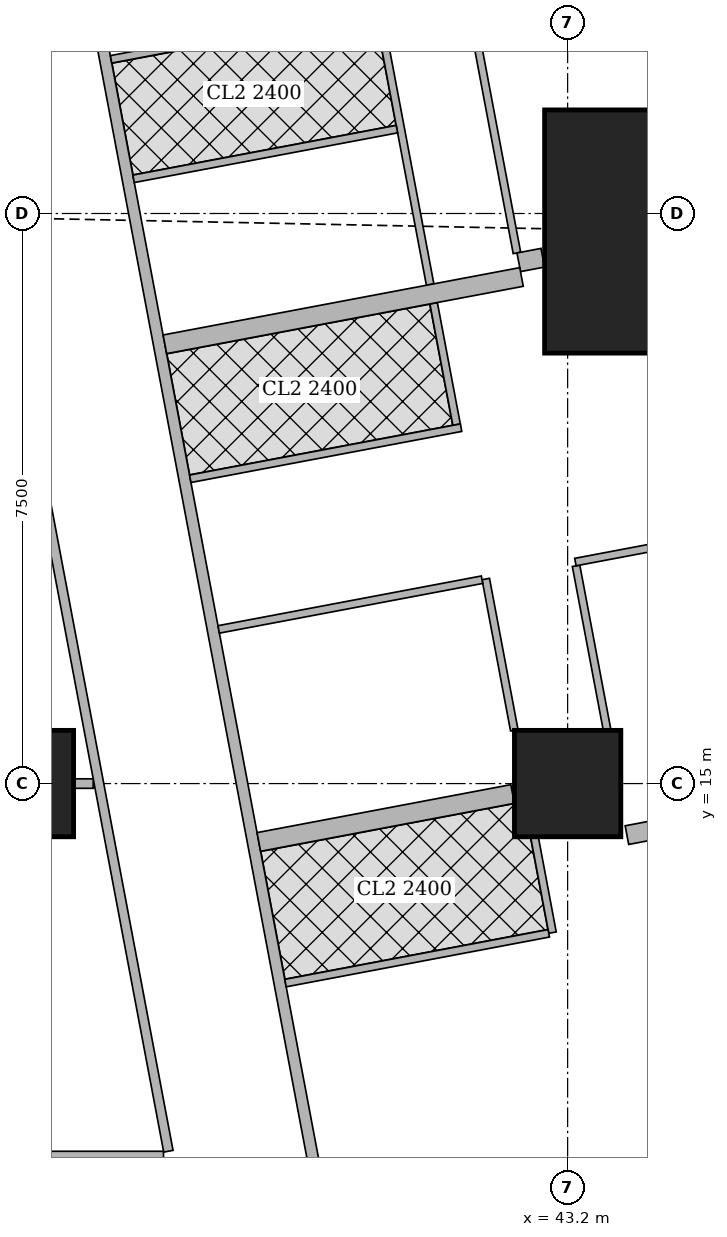
"""IFC4 building model, lengths in metres.
Left out: names, types, materials, properties, quantities, classifications, styles, units other than length and angle.
Written with IfcOpenShell. Run it as: python <this file> out.ifc"""

import sys

from ifc_helpers import new_model, si_unit, direction, frame, frame_2d, origin, origin_2d, place, context, subcontext, project, spatial, rectangle, extrude, element, fill, save


model = new_model("IFC4")
c1 = context("Model", 3, precision=1e-05, world=origin(), true_north=direction((0.0, 1.0)))
c2 = subcontext(c1, "Body", "Model", "MODEL_VIEW")
j1 = project(units=[si_unit("LENGTHUNIT", "METRE"), si_unit("PLANEANGLEUNIT", "RADIAN")], contexts=[c1])
p1 = place(None, origin())
s1 = spatial("IfcSite", under=j1, at=p1, CompositionType="ELEMENT")
p2 = place(p1, origin())
s2 = spatial("IfcBuilding", under=s1, at=p2, CompositionType="ELEMENT")
p3 = place(p2, frame((0.0, 0.0, 251.6)))
s3 = spatial("IfcBuildingStorey", under=s2, at=p3, CompositionType="ELEMENT", Elevation=251.6)
for number, where, z_axis, x_axis in (
    (1, (36.0, 15.0, 0.0), (0.0, 0.0, 1.0), (1.0, 0.0, 0.0)),
    (2, (43.2, 15.0, 0.0), (0.0, 0.0, 1.0), (1.0, 0.0, 0.0)),
):
    element("IfcColumn", number, at=place(p3, frame(where, z_axis=z_axis, x_axis=x_axis)), inside=s3, PredefinedType="COLUMN", context=c2, shape_type="SweptSolid", body=[
        extrude(rectangle(XDim=1.4, YDim=1.4, at=origin_2d()), origin(), (0.0, 0.0, 1.0), 3.75),
    ])
p4 = place(p3, frame((44.697, 22.263, 0.0), z_axis=(0.0, 0.0, 1.0), x_axis=(1.0, 0.0, 0.0)))
e3 = element("IfcColumn", 3, at=p4, inside=s3, PredefinedType="COLUMN", context=c2, shape_type="SweptSolid", body=[
    extrude(rectangle(XDim=3.6, YDim=3.2, at=origin_2d()), origin(), (0.0, 0.0, 1.0), 3.75),
])
p5 = place(p3, frame((49.684, 7.832, 0.0), z_axis=(0.0, 0.0, 1.0), x_axis=(-0.185616669694, 0.982622232565, 0.0)))
e4 = element("IfcWall", 4, at=p5, inside=s3, PredefinedType="SOLIDWALL", context=c2, shape_type="SweptSolid", body=[
    extrude(rectangle(XDim=36.0, YDim=0.2, at=frame_2d((18.0, 0.0))), origin(), (0.0, 0.0, 1.0), 3.5),
])
p6 = place(p5, frame((2.518, 0.0, 0.9)))
e5 = element("IfcOpeningElement", 5, at=p6, cuts=e4, PredefinedType="OPENING", context=c2, shape_type="SweptSolid", body=[
    extrude(rectangle(XDim=2.4, YDim=1.5, at=frame_2d((1.2, 0.75))), frame((0.0, 0.11, 0.0), z_axis=(0.0, -1.0, 0.0), x_axis=(1.0, 0.0, 0.0)), (0.0, 0.0, 1.0), 0.22),
])
p7 = place(p5, frame((8.444, 0.0, 0.9)))
e6 = element("IfcOpeningElement", 6, at=p7, cuts=e4, PredefinedType="OPENING", context=c2, shape_type="SweptSolid", body=[
    extrude(rectangle(XDim=1.8, YDim=1.5, at=frame_2d((0.9, 0.75))), frame((0.0, 0.11, 0.0), z_axis=(0.0, -1.0, 0.0), x_axis=(1.0, 0.0, 0.0)), (0.0, 0.0, 1.0), 0.22),
])
p8 = place(p5, frame((12.261, 0.0, 0.9)))
e7 = element("IfcOpeningElement", 7, at=p8, cuts=e4, PredefinedType="OPENING", context=c2, shape_type="SweptSolid", body=[
    extrude(rectangle(XDim=1.8, YDim=1.5, at=frame_2d((0.9, 0.75))), frame((0.0, 0.11, 0.0), z_axis=(0.0, -1.0, 0.0), x_axis=(1.0, 0.0, 0.0)), (0.0, 0.0, 1.0), 0.22),
])
p9 = place(p5, frame((16.078, 0.0, 0.9)))
e8 = element("IfcOpeningElement", 8, at=p9, cuts=e4, PredefinedType="OPENING", context=c2, shape_type="SweptSolid", body=[
    extrude(rectangle(XDim=1.8, YDim=1.5, at=frame_2d((0.9, 0.75))), frame((0.0, 0.11, 0.0), z_axis=(0.0, -1.0, 0.0), x_axis=(1.0, 0.0, 0.0)), (0.0, 0.0, 1.0), 0.22),
])
p10 = place(p5, frame((19.894, 0.0, 0.9)))
e9 = element("IfcOpeningElement", 9, at=p10, cuts=e4, PredefinedType="OPENING", context=c2, shape_type="SweptSolid", body=[
    extrude(rectangle(XDim=1.8, YDim=1.5, at=frame_2d((0.9, 0.75))), frame((0.0, 0.11, 0.0), z_axis=(0.0, -1.0, 0.0), x_axis=(1.0, 0.0, 0.0)), (0.0, 0.0, 1.0), 0.22),
])
p11 = place(p5, frame((23.71, 0.0, 0.9)))
e10 = element("IfcOpeningElement", 10, at=p11, cuts=e4, PredefinedType="OPENING", context=c2, shape_type="SweptSolid", body=[
    extrude(rectangle(XDim=1.8, YDim=1.5, at=frame_2d((0.9, 0.75))), frame((0.0, 0.11, 0.0), z_axis=(0.0, -1.0, 0.0), x_axis=(1.0, 0.0, 0.0)), (0.0, 0.0, 1.0), 0.22),
])
p12 = place(p5, frame((27.526, 0.0, 0.9)))
e11 = element("IfcOpeningElement", 11, at=p12, cuts=e4, PredefinedType="OPENING", context=c2, shape_type="SweptSolid", body=[
    extrude(rectangle(XDim=1.8, YDim=1.5, at=frame_2d((0.9, 0.75))), frame((0.0, 0.11, 0.0), z_axis=(0.0, -1.0, 0.0), x_axis=(1.0, 0.0, 0.0)), (0.0, 0.0, 1.0), 0.22),
])
p13 = place(p5, frame((32.046, 0.0, 0.9)))
e12 = element("IfcOpeningElement", 12, at=p13, cuts=e4, PredefinedType="OPENING", context=c2, shape_type="SweptSolid", body=[
    extrude(rectangle(XDim=1.8, YDim=1.5, at=frame_2d((0.9, 0.75))), frame((0.0, 0.11, 0.0), z_axis=(0.0, -1.0, 0.0), x_axis=(1.0, 0.0, 0.0)), (0.0, 0.0, 1.0), 0.22),
])
p14 = place(p3, frame((33.781, 42.186, 0.0), z_axis=(0.0, 0.0, 1.0), x_axis=(0.185593518645, -0.9826266055, 0.0)))
e13 = element("IfcWall", 13, at=p14, inside=s3, PredefinedType="SOLIDWALL", context=c2, shape_type="SweptSolid", body=[
    extrude(rectangle(XDim=35.961, YDim=0.15, at=frame_2d((17.98, 0.0))), origin(), (0.0, 0.0, 1.0), 2.5),
])
p15 = place(p14, frame((7.183, 0.0, 0.0)))
e14 = element("IfcOpeningElement", 14, at=p15, cuts=e13, PredefinedType="OPENING", context=c2, shape_type="SweptSolid", body=[
    extrude(rectangle(XDim=1.0, YDim=2.1, at=frame_2d((0.5, 1.05))), frame((0.0, 0.085, 0.0), z_axis=(0.0, -1.0, 0.0), x_axis=(1.0, 0.0, 0.0)), (0.0, 0.0, 1.0), 0.17),
])
p16 = place(p14, frame((11.76, 0.0, 0.0)))
e15 = element("IfcOpeningElement", 15, at=p16, cuts=e13, PredefinedType="OPENING", context=c2, shape_type="SweptSolid", body=[
    extrude(rectangle(XDim=1.0, YDim=2.1, at=frame_2d((0.5, 1.05))), frame((0.0, 0.085, 0.0), z_axis=(0.0, -1.0, 0.0), x_axis=(1.0, 0.0, 0.0)), (0.0, 0.0, 1.0), 0.17),
])
p17 = place(p14, frame((23.863, 0.0, 0.0)))
e16 = element("IfcOpeningElement", 16, at=p17, cuts=e13, PredefinedType="OPENING", context=c2, shape_type="SweptSolid", body=[
    extrude(rectangle(XDim=1.0, YDim=2.1, at=frame_2d((0.5, 1.05))), frame((0.0, 0.085, 0.0), z_axis=(0.0, -1.0, 0.0), x_axis=(1.0, 0.0, 0.0)), (0.0, 0.0, 1.0), 0.17),
])
p18 = place(p14, frame((30.502, 0.0, 0.0)))
e17 = element("IfcOpeningElement", 17, at=p18, cuts=e13, PredefinedType="OPENING", context=c2, shape_type="SweptSolid", body=[
    extrude(rectangle(XDim=1.0, YDim=2.1, at=frame_2d((0.5, 1.05))), frame((0.0, 0.085, 0.0), z_axis=(0.0, -1.0, 0.0), x_axis=(1.0, 0.0, 0.0)), (0.0, 0.0, 1.0), 0.17),
])
p19 = place(p3, frame((41.157, 29.273, 0.0), z_axis=(0.0, 0.0, 1.0), x_axis=(0.18542464283, -0.982658486877, 0.0)))
e18 = element("IfcWall", 18, at=p19, inside=s3, PredefinedType="PARTITIONING", context=c2, shape_type="SweptSolid", body=[
    extrude(rectangle(XDim=7.421, YDim=0.1, at=frame_2d((3.71, 0.0))), origin(), (0.0, 0.0, 1.0), 2.5),
])
p20 = place(p19, frame((0.8, 0.0, 0.0)))
e19 = element("IfcOpeningElement", 19, at=p20, cuts=e18, PredefinedType="OPENING", context=c2, shape_type="SweptSolid", body=[
    extrude(rectangle(XDim=0.9, YDim=2.1, at=frame_2d((0.45, 1.05))), frame((0.0, 0.06, 0.0), z_axis=(0.0, -1.0, 0.0), x_axis=(1.0, 0.0, 0.0)), (0.0, 0.0, 1.0), 0.12),
])
p21 = place(p19, frame((4.126, 0.0, 0.0)))
e20 = element("IfcOpeningElement", 20, at=p21, cuts=e18, PredefinedType="OPENING", context=c2, shape_type="SweptSolid", body=[
    extrude(rectangle(XDim=0.9, YDim=2.1, at=frame_2d((0.45, 1.05))), frame((0.0, 0.06, 0.0), z_axis=(0.0, -1.0, 0.0), x_axis=(1.0, 0.0, 0.0)), (0.0, 0.0, 1.0), 0.12),
])
p22 = place(p3, frame((39.997, 28.942, 0.0), z_axis=(0.0, 0.0, 1.0), x_axis=(0.185686318797, -0.982609073341, 0.0)))
e21 = element("IfcWall", 21, at=p22, inside=s3, PredefinedType="PARTITIONING", context=c2, shape_type="SweptSolid", body=[
    extrude(rectangle(XDim=7.508, YDim=0.1, at=frame_2d((3.754, 0.0))), origin(), (0.0, 0.0, 1.0), 2.5),
])
p23 = place(p22, frame((0.576, 0.0, 0.0)))
e22 = element("IfcOpeningElement", 22, at=p23, cuts=e21, PredefinedType="OPENING", context=c2, shape_type="SweptSolid", body=[
    extrude(rectangle(XDim=0.9, YDim=2.1, at=frame_2d((0.45, 1.05))), frame((0.0, 0.06, 0.0), z_axis=(0.0, -1.0, 0.0), x_axis=(1.0, 0.0, 0.0)), (0.0, 0.0, 1.0), 0.12),
])
p24 = place(p22, frame((4.166, 0.0, 0.0)))
e23 = element("IfcOpeningElement", 23, at=p24, cuts=e21, PredefinedType="OPENING", context=c2, shape_type="SweptSolid", body=[
    extrude(rectangle(XDim=0.9, YDim=2.1, at=frame_2d((0.45, 1.05))), frame((0.0, 0.06, 0.0), z_axis=(0.0, -1.0, 0.0), x_axis=(1.0, 0.0, 0.0)), (0.0, 0.0, 1.0), 0.12),
])
p25 = place(p22, frame((2.483, 0.0, 0.0)))
e24 = element("IfcOpeningElement", 24, at=p25, cuts=e21, PredefinedType="OPENING", context=c2, shape_type="SweptSolid", body=[
    extrude(rectangle(XDim=0.9, YDim=2.1, at=frame_2d((0.45, 1.05))), frame((0.0, 0.06, 0.0), z_axis=(0.0, -1.0, 0.0), x_axis=(1.0, 0.0, 0.0)), (0.0, 0.0, 1.0), 0.12),
])
p26 = place(p22, frame((6.074, 0.0, 0.0)))
e25 = element("IfcOpeningElement", 25, at=p26, cuts=e21, PredefinedType="OPENING", context=c2, shape_type="SweptSolid", body=[
    extrude(rectangle(XDim=0.9, YDim=2.1, at=frame_2d((0.45, 1.05))), frame((0.0, 0.06, 0.0), z_axis=(0.0, -1.0, 0.0), x_axis=(1.0, 0.0, 0.0)), (0.0, 0.0, 1.0), 0.12),
])
p27 = place(p3, frame((40.656, 25.183, 0.0), z_axis=(0.0, 0.0, 1.0), x_axis=(-0.982576058723, -0.185860939478, 0.0)))
e26 = element("IfcWall", 26, at=p27, inside=s3, PredefinedType="PARTITIONING", context=c2, shape_type="SweptSolid", body=[
    extrude(rectangle(XDim=3.524, YDim=0.1, at=frame_2d((1.762, 0.0))), origin(), (0.0, 0.0, 1.0), 3.5),
])
p28 = place(p3, frame((40.954, 23.61, 0.0), z_axis=(0.0, 0.0, 1.0), x_axis=(-0.98264808502, -0.18547975902, 0.0)))
e27 = element("IfcWall", 27, at=p28, inside=s3, PredefinedType="PARTITIONING", context=c2, shape_type="SweptSolid", body=[
    extrude(rectangle(XDim=3.526, YDim=0.1, at=frame_2d((1.763, 0.0))), origin(), (0.0, 0.0, 1.0), 2.5),
])
p29 = place(p3, frame((41.437, 21.319, 0.0), z_axis=(0.0, 0.0, 1.0), x_axis=(0.185793689589, -0.982588777113, 0.0)))
e28 = element("IfcWall", 28, at=p29, inside=s3, PredefinedType="PARTITIONING", context=c2, shape_type="SweptSolid", body=[
    extrude(rectangle(XDim=1.625, YDim=0.1, at=frame_2d((0.813, 0.0))), origin(), (0.0, 0.0, 1.0), 3.5),
])
p30 = place(p29, frame((0.325, 0.0, 0.0)))
e29 = element("IfcOpeningElement", 29, at=p30, cuts=e28, PredefinedType="OPENING", context=c2, shape_type="SweptSolid", body=[
    extrude(rectangle(XDim=0.9, YDim=2.1, at=frame_2d((0.45, 1.05))), frame((0.0, 0.06, 0.0), z_axis=(0.0, -1.0, 0.0), x_axis=(1.0, 0.0, 0.0)), (0.0, 0.0, 1.0), 0.12),
])
p31 = place(p3, frame((41.798, 19.682, 0.0), z_axis=(0.0, 0.0, 1.0), x_axis=(-0.982681091817, -0.185304807776, 0.0)))
e30 = element("IfcWall", 30, at=p31, inside=s3, PredefinedType="PARTITIONING", context=c2, shape_type="SweptSolid", body=[
    extrude(rectangle(XDim=3.626, YDim=0.1, at=frame_2d((1.813, 0.0))), origin(), (0.0, 0.0, 1.0), 3.5),
])
p32 = place(p3, frame((43.311, 17.865, 0.0), z_axis=(0.0, 0.0, 1.0), x_axis=(0.185572140257, -0.982630643101, 0.0)))
e31 = element("IfcWall", 31, at=p32, inside=s3, PredefinedType="PARTITIONING", context=c2, shape_type="SweptSolid", body=[
    extrude(rectangle(XDim=2.193, YDim=0.1, at=frame_2d((1.097, 0.0))), origin(), (0.0, 0.0, 1.0), 3.5),
])
p33 = place(p32, frame((0.15, 0.0, 0.0)))
e32 = element("IfcOpeningElement", 32, at=p33, cuts=e31, PredefinedType="OPENING", context=c2, shape_type="SweptSolid", body=[
    extrude(rectangle(XDim=0.9, YDim=2.1, at=frame_2d((0.45, 1.05))), frame((0.0, 0.06, 0.0), z_axis=(0.0, -1.0, 0.0), x_axis=(1.0, 0.0, 0.0)), (0.0, 0.0, 1.0), 0.12),
])
p34 = place(p3, frame((42.123, 17.691, 0.0), z_axis=(0.0, 0.0, 1.0), x_axis=(0.185183804812, -0.98270390171, 0.0)))
e33 = element("IfcWall", 33, at=p34, inside=s3, PredefinedType="PARTITIONING", context=c2, shape_type="SweptSolid", body=[
    extrude(rectangle(XDim=2.025, YDim=0.1, at=frame_2d((1.012, 0.0))), origin(), (0.0, 0.0, 1.0), 3.5),
])
p35 = place(p3, frame((47.527, 18.712, 0.0), z_axis=(0.0, 0.0, 1.0), x_axis=(-0.982633535512, -0.185556823879, 0.0)))
e34 = element("IfcWall", 34, at=p35, inside=s3, PredefinedType="PARTITIONING", context=c2, shape_type="SweptSolid", body=[
    extrude(rectangle(XDim=4.3, YDim=0.1, at=frame_2d((2.15, 0.0))), origin(), (0.0, 0.0, 1.0), 2.5),
])
p36 = place(p3, frame((42.074, 17.682, 0.0), z_axis=(0.0, 0.0, 1.0), x_axis=(-0.982660701716, -0.185412904897, 0.0)))
e35 = element("IfcWall", 35, at=p36, inside=s3, PredefinedType="PARTITIONING", context=c2, shape_type="SweptSolid", body=[
    extrude(rectangle(XDim=3.526, YDim=0.1, at=frame_2d((1.763, 0.0))), origin(), (0.0, 0.0, 1.0), 3.5),
])
p37 = place(p36, frame((1.326, 0.0, 0.0)))
e36 = element("IfcOpeningElement", 36, at=p37, cuts=e35, PredefinedType="OPENING", context=c2, shape_type="SweptSolid", body=[
    extrude(rectangle(XDim=0.9, YDim=2.1, at=frame_2d((0.45, 1.05))), frame((0.0, 0.06, 0.0), z_axis=(0.0, -1.0, 0.0), x_axis=(1.0, 0.0, 0.0)), (0.0, 0.0, 1.0), 0.12),
])
p38 = place(p3, frame((42.873, 21.918, 0.0), z_axis=(0.0, 0.0, 1.0), x_axis=(-0.982431406936, -0.186624035603, 0.0)))
e37 = element("IfcWall", 37, at=p38, inside=s3, PredefinedType="SOLIDWALL", context=c2, shape_type="SweptSolid", body=[
    extrude(rectangle(XDim=0.322, YDim=0.25, at=frame_2d((0.161, 0.0))), origin(), (0.0, 0.0, 1.0), 2.5),
])
p39 = place(p3, frame((42.593, 21.665, 0.0), z_axis=(0.0, 0.0, 1.0), x_axis=(-0.982635807605, -0.185544791394, 0.0)))
e38 = element("IfcWall", 38, at=p39, inside=s3, PredefinedType="SOLIDWALL", context=c2, shape_type="SweptSolid", body=[
    extrude(rectangle(XDim=4.775, YDim=0.25, at=frame_2d((2.388, 0.0))), origin(), (0.0, 0.0, 1.0), 2.5),
])
p40 = place(p3, frame((42.765, 14.29, 0.0), z_axis=(0.0, 0.0, 1.0), x_axis=(0.185446293138, -0.982654401283, 0.0)))
e39 = element("IfcWall", 39, at=p40, inside=s3, PredefinedType="PARTITIONING", context=c2, shape_type="SweptSolid", body=[
    extrude(rectangle(XDim=1.273, YDim=0.1, at=frame_2d((0.636, 0.0))), origin(), (0.0, 0.0, 1.0), 3.5),
])
p41 = place(p3, frame((42.952, 13.03, 0.0), z_axis=(0.0, 0.0, 1.0), x_axis=(-0.982585626838, -0.185810349366, 0.0)))
e40 = element("IfcWall", 40, at=p41, inside=s3, PredefinedType="PARTITIONING", context=c2, shape_type="SweptSolid", body=[
    extrude(rectangle(XDim=3.525, YDim=0.1, at=frame_2d((1.763, 0.0))), origin(), (0.0, 0.0, 1.0), 3.5),
])
p42 = place(p41, frame((1.299, 0.0, 0.0)))
e41 = element("IfcOpeningElement", 41, at=p42, cuts=e40, PredefinedType="OPENING", context=c2, shape_type="SweptSolid", body=[
    extrude(rectangle(XDim=0.9, YDim=2.1, at=frame_2d((0.45, 1.05))), frame((0.0, 0.06, 0.0), z_axis=(0.0, -1.0, 0.0), x_axis=(1.0, 0.0, 0.0)), (0.0, 0.0, 1.0), 0.12),
])
p43 = place(p3, frame((45.29, 14.569, 0.0), z_axis=(0.0, 0.0, 1.0), x_axis=(-0.982676759201, -0.185327782391, 0.0)))
e42 = element("IfcWall", 42, at=p43, inside=s3, PredefinedType="SOLIDWALL", context=c2, shape_type="SweptSolid", body=[
    extrude(rectangle(XDim=1.333, YDim=0.25, at=frame_2d((0.667, 0.0))), origin(), (0.0, 0.0, 1.0), 3.5),
])
p44 = place(p3, frame((42.476, 14.863, 0.0), z_axis=(0.0, 0.0, 1.0), x_axis=(-0.982603567712, -0.185715450942, 0.0)))
e43 = element("IfcWall", 43, at=p44, inside=s3, PredefinedType="SOLIDWALL", context=c2, shape_type="SweptSolid", body=[
    extrude(rectangle(XDim=3.398, YDim=0.25, at=frame_2d((1.699, 0.0))), origin(), (0.0, 0.0, 1.0), 3.5),
])
p45 = place(p3, frame((28.95, 10.1, 0.0), z_axis=(0.0, 0.0, 1.0), x_axis=(1.0, 0.0, 0.0)))
e44 = element("IfcWall", 44, at=p45, inside=s3, PredefinedType="PARTITIONING", context=c2, shape_type="SweptSolid", body=[
    extrude(rectangle(XDim=8.933, YDim=0.125, at=frame_2d((4.467, 0.0))), origin(), (0.0, 0.0, 1.0), 3.5),
])
p46 = place(p3, frame((37.947, 10.163, 0.0), z_axis=(0.0, 0.0, 1.0), x_axis=(-0.185589250699, 0.982627411599, 0.0)))
e45 = element("IfcWall", 45, at=p46, inside=s3, PredefinedType="PARTITIONING", context=c2, shape_type="SweptSolid", body=[
    extrude(rectangle(XDim=12.555, YDim=0.125, at=frame_2d((6.277, 0.0))), origin(), (0.0, 0.0, 1.0), 2.5),
])
p47 = place(p46, frame((0.708, 0.0, 0.0)))
e46 = element("IfcOpeningElement", 46, at=p47, cuts=e45, PredefinedType="OPENING", context=c2, shape_type="SweptSolid", body=[
    extrude(rectangle(XDim=1.0, YDim=2.1, at=frame_2d((0.5, 1.05))), frame((0.0, 0.073, 0.0), z_axis=(0.0, -1.0, 0.0), x_axis=(1.0, 0.0, 0.0)), (0.0, 0.0, 1.0), 0.145),
])
p48 = place(p46, frame((5.9, 0.0, 0.0)))
e47 = element("IfcOpeningElement", 47, at=p48, cuts=e45, PredefinedType="OPENING", context=c2, shape_type="SweptSolid", body=[
    extrude(rectangle(XDim=1.0, YDim=2.1, at=frame_2d((0.5, 1.05))), frame((0.0, 0.073, 0.0), z_axis=(0.0, -1.0, 0.0), x_axis=(1.0, 0.0, 0.0)), (0.0, 0.0, 1.0), 0.145),
])
p49 = place(p46, frame((9.562, 0.0, 0.0)))
e48 = element("IfcOpeningElement", 48, at=p49, cuts=e45, PredefinedType="OPENING", context=c2, shape_type="SweptSolid", body=[
    extrude(rectangle(XDim=1.0, YDim=2.1, at=frame_2d((0.5, 1.05))), frame((0.0, 0.073, 0.0), z_axis=(0.0, -1.0, 0.0), x_axis=(1.0, 0.0, 0.0)), (0.0, 0.0, 1.0), 0.145),
])
p50 = place(p3, frame((36.701, 15.0, 0.0), z_axis=(0.0, 0.0, 1.0), x_axis=(1.0, 0.0, 0.0)))
e49 = element("IfcWall", 49, at=p50, inside=s3, PredefinedType="PARTITIONING", context=c2, shape_type="SweptSolid", body=[
    extrude(rectangle(XDim=0.257, YDim=0.125, at=frame_2d((0.128, 0.0))), origin(), (0.0, 0.0, 1.0), 3.5),
])
p51 = place(p21, origin())
e50 = element("IfcDoor", 50, at=p51, inside=s3, OperationType="SINGLE_SWING_LEFT", PredefinedType="DOOR", context=c2, shape_type="SweptSolid", body=[
    extrude(rectangle(XDim=0.9, YDim=2.1, at=frame_2d((0.45, 1.05))), frame((0.0, 0.025, 0.0), z_axis=(0.0, -1.0, 0.0), x_axis=(1.0, 0.0, 0.0)), (0.0, 0.0, 1.0), 0.05),
])
fill(e20, e50)
p52 = place(p24, origin())
e51 = element("IfcDoor", 51, at=p52, inside=s3, OperationType="SINGLE_SWING_LEFT", PredefinedType="DOOR", context=c2, shape_type="SweptSolid", body=[
    extrude(rectangle(XDim=0.9, YDim=2.1, at=frame_2d((0.45, 1.05))), frame((0.0, 0.025, 0.0), z_axis=(0.0, -1.0, 0.0), x_axis=(1.0, 0.0, 0.0)), (0.0, 0.0, 1.0), 0.05),
])
fill(e23, e51)
p53 = place(p26, origin())
e52 = element("IfcDoor", 52, at=p53, inside=s3, OperationType="SINGLE_SWING_LEFT", PredefinedType="DOOR", context=c2, shape_type="SweptSolid", body=[
    extrude(rectangle(XDim=0.9, YDim=2.1, at=frame_2d((0.45, 1.05))), frame((0.0, 0.025, 0.0), z_axis=(0.0, -1.0, 0.0), x_axis=(1.0, 0.0, 0.0)), (0.0, 0.0, 1.0), 0.05),
])
fill(e25, e52)
p54 = place(p30, origin())
e53 = element("IfcDoor", 53, at=p54, inside=s3, OperationType="SINGLE_SWING_RIGHT", PredefinedType="DOOR", context=c2, shape_type="SweptSolid", body=[
    extrude(rectangle(XDim=0.9, YDim=2.1, at=frame_2d((0.45, 1.05))), frame((0.0, 0.025, 0.0), z_axis=(0.0, -1.0, 0.0), x_axis=(1.0, 0.0, 0.0)), (0.0, 0.0, 1.0), 0.05),
])
fill(e29, e53)
p55 = place(p33, origin())
e54 = element("IfcDoor", 54, at=p55, inside=s3, OperationType="SINGLE_SWING_LEFT", PredefinedType="DOOR", context=c2, shape_type="SweptSolid", body=[
    extrude(rectangle(XDim=0.9, YDim=2.1, at=frame_2d((0.45, 1.05))), frame((0.0, 0.025, 0.0), z_axis=(0.0, -1.0, 0.0), x_axis=(1.0, 0.0, 0.0)), (0.0, 0.0, 1.0), 0.05),
])
fill(e32, e54)
p56 = place(p17, origin())
e55 = element("IfcDoor", 55, at=p56, inside=s3, OperationType="SINGLE_SWING_LEFT", PredefinedType="DOOR", context=c2, shape_type="SweptSolid", body=[
    extrude(rectangle(XDim=1.0, YDim=2.1, at=frame_2d((0.5, 1.05))), frame((0.0, 0.025, 0.0), z_axis=(0.0, -1.0, 0.0), x_axis=(1.0, 0.0, 0.0)), (0.0, 0.0, 1.0), 0.05),
])
fill(e16, e55)
p57 = place(p42, origin())
e56 = element("IfcDoor", 56, at=p57, inside=s3, OperationType="SINGLE_SWING_RIGHT", PredefinedType="DOOR", context=c2, shape_type="SweptSolid", body=[
    extrude(rectangle(XDim=0.9, YDim=2.1, at=frame_2d((0.45, 1.05))), frame((0.0, 0.025, 0.0), z_axis=(0.0, -1.0, 0.0), x_axis=(1.0, 0.0, 0.0)), (0.0, 0.0, 1.0), 0.05),
])
fill(e41, e56)
p58 = place(p18, origin())
e57 = element("IfcDoor", 57, at=p58, inside=s3, OperationType="SINGLE_SWING_LEFT", PredefinedType="DOOR", context=c2, shape_type="SweptSolid", body=[
    extrude(rectangle(XDim=1.0, YDim=2.1, at=frame_2d((0.5, 1.05))), frame((0.0, 0.025, 0.0), z_axis=(0.0, -1.0, 0.0), x_axis=(1.0, 0.0, 0.0)), (0.0, 0.0, 1.0), 0.05),
])
fill(e17, e57)
p59 = place(p37, origin())
e58 = element("IfcDoor", 58, at=p59, inside=s3, OperationType="SINGLE_SWING_RIGHT", PredefinedType="DOOR", context=c2, shape_type="SweptSolid", body=[
    extrude(rectangle(XDim=0.9, YDim=2.1, at=frame_2d((0.45, 1.05))), frame((0.0, 0.025, 0.0), z_axis=(0.0, -1.0, 0.0), x_axis=(1.0, 0.0, 0.0)), (0.0, 0.0, 1.0), 0.05),
])
fill(e36, e58)
p60 = place(p47, origin())
e59 = element("IfcDoor", 59, at=p60, inside=s3, OperationType="SINGLE_SWING_LEFT", PredefinedType="DOOR", context=c2, shape_type="SweptSolid", body=[
    extrude(rectangle(XDim=1.0, YDim=2.1, at=frame_2d((0.5, 1.05))), frame((0.0, 0.025, 0.0), z_axis=(0.0, -1.0, 0.0), x_axis=(1.0, 0.0, 0.0)), (0.0, 0.0, 1.0), 0.05),
])
fill(e46, e59)
p61 = place(p48, origin())
e60 = element("IfcDoor", 60, at=p61, inside=s3, OperationType="SINGLE_SWING_LEFT", PredefinedType="DOOR", context=c2, shape_type="SweptSolid", body=[
    extrude(rectangle(XDim=1.0, YDim=2.1, at=frame_2d((0.5, 1.05))), frame((0.0, 0.025, 0.0), z_axis=(0.0, -1.0, 0.0), x_axis=(1.0, 0.0, 0.0)), (0.0, 0.0, 1.0), 0.05),
])
fill(e47, e60)
save(model, sys.argv[1])
